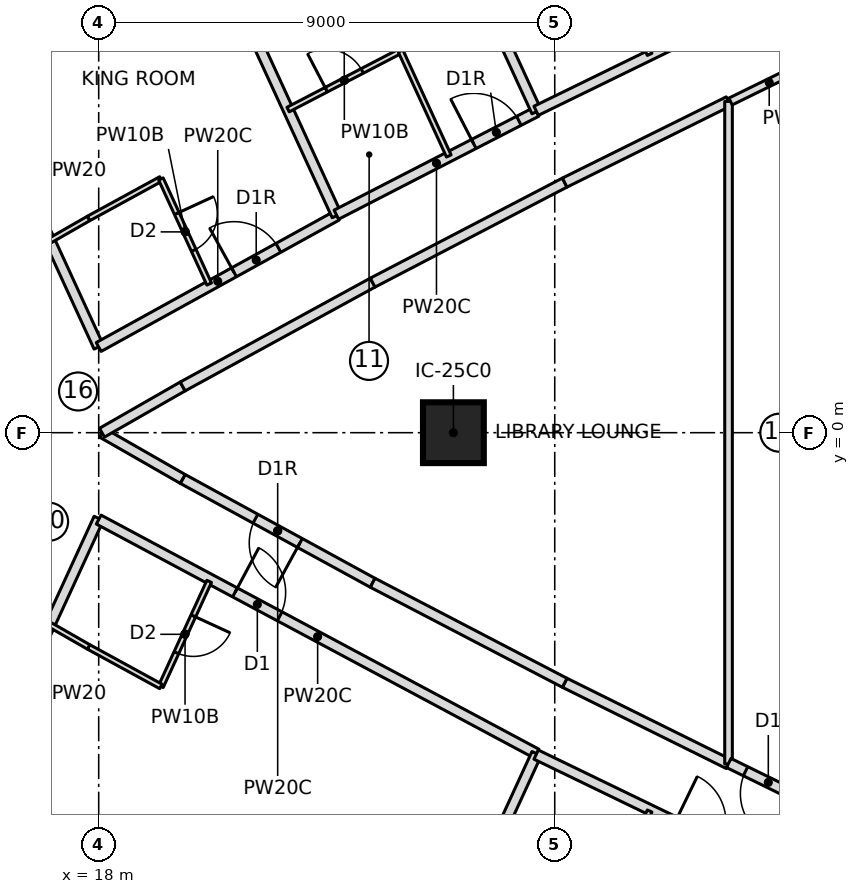
"""IFC4 building model, lengths in metres.
Left out: names, types, materials, properties, quantities, classifications, styles, units other than length and angle.
Written with IfcOpenShell. Run it as: python <this file> out.ifc"""

import sys

from ifc_helpers import new_model, si_unit, direction, frame, frame_2d, origin, origin_2d, place, context, subcontext, project, spatial, rectangle, extrude, element, fill, save


model = new_model("IFC4")
c1 = context("Model", 3, precision=1e-05, world=origin(), true_north=direction((0.0, 1.0)))
c2 = subcontext(c1, "Body", "Model", "MODEL_VIEW")
j1 = project(units=[si_unit("LENGTHUNIT", "METRE"), si_unit("PLANEANGLEUNIT", "RADIAN")], contexts=[c1])
p1 = place(None, origin())
s1 = spatial("IfcSite", under=j1, at=p1, CompositionType="ELEMENT")
p2 = place(p1, origin())
s2 = spatial("IfcBuilding", under=s1, at=p2, CompositionType="ELEMENT")
p3 = place(p2, frame((0.0, 0.0, 84.9)))
s3 = spatial("IfcBuildingStorey", under=s2, at=p3, CompositionType="ELEMENT", Elevation=84.9)
p4 = place(p3, frame((25.0, 0.0, 0.0), z_axis=(0.0, 0.0, 1.0), x_axis=(1.0, 0.0, 0.0)))
e1 = element("IfcColumn", 1, at=p4, inside=s3, PredefinedType="COLUMN", context=c2, shape_type="SweptSolid", body=[
    extrude(rectangle(XDim=1.2, YDim=1.2, at=origin_2d()), origin(), (0.0, 0.0, 1.0), 3.55),
])
p5 = place(p3, frame((14.815, 8.626, 0.0), z_axis=(0.0, 0.0, 1.0), x_axis=(0.417432341259, -0.908708006166, 0.0)))
e2 = element("IfcWall", 2, at=p5, inside=s3, PredefinedType="PARTITIONING", context=c2, shape_type="SweptSolid", body=[
    extrude(rectangle(XDim=7.631, YDim=0.2, at=frame_2d((3.815, 0.0))), origin(), (0.0, 0.0, 1.0), 3.25),
])
p6 = place(p3, frame((18.0, 1.692, 0.0), z_axis=(0.0, 0.0, 1.0), x_axis=(0.875548487611, 0.483130257634, 0.0)))
e3 = element("IfcWall", 3, at=p6, inside=s3, PredefinedType="PARTITIONING", context=c2, shape_type="SweptSolid", body=[
    extrude(rectangle(XDim=5.367, YDim=0.2, at=frame_2d((2.683, 0.0))), origin(), (0.0, 0.0, 1.0), 3.25),
])
p7 = place(p6, frame((3.05, 0.0, 0.0)))
e4 = element("IfcOpeningElement", 4, at=p7, cuts=e3, PredefinedType="OPENING", context=c2, shape_type="SweptSolid", body=[
    extrude(rectangle(XDim=1.0, YDim=2.1, at=frame_2d((0.5, 1.05))), frame((0.0, 0.11, 0.0), z_axis=(0.0, -1.0, 0.0), x_axis=(1.0, 0.0, 0.0)), (0.0, 0.0, 1.0), 0.22),
])
p8 = place(p3, frame((17.036, 3.79, 0.0), z_axis=(0.0, 0.0, 1.0), x_axis=(0.867629162742, 0.497211862248, 0.0)))
e5 = element("IfcWall", 5, at=p8, inside=s3, PredefinedType="PARTITIONING", context=c2, shape_type="SweptSolid", body=[
    extrude(rectangle(XDim=0.882, YDim=0.1, at=frame_2d((0.441, 0.0))), origin(), (0.0, 0.0, 1.0), 3.25),
])
p9 = place(p3, frame((17.801, 4.229, 0.0), z_axis=(0.0, 0.0, 1.0), x_axis=(0.877424481957, 0.479714788663, 0.0)))
e6 = element("IfcWall", 6, at=p9, inside=s3, PredefinedType="PARTITIONING", context=c2, shape_type="SweptSolid", body=[
    extrude(rectangle(XDim=1.625, YDim=0.1, at=frame_2d((0.813, 0.0))), origin(), (0.0, 0.0, 1.0), 3.25),
])
p10 = place(p3, frame((19.228, 5.008, 0.0), z_axis=(0.0, 0.0, 1.0), x_axis=(0.417450047292, -0.908699872354, 0.0)))
e7 = element("IfcWall", 7, at=p10, inside=s3, PredefinedType="PARTITIONING", context=c2, shape_type="SweptSolid", body=[
    extrude(rectangle(XDim=2.283, YDim=0.1, at=frame_2d((1.141, 0.0))), origin(), (0.0, 0.0, 1.0), 3.25),
])
p11 = place(p10, frame((0.75, 0.0, 0.0)))
e8 = element("IfcOpeningElement", 8, at=p11, cuts=e7, PredefinedType="OPENING", context=c2, shape_type="SweptSolid", body=[
    extrude(rectangle(XDim=0.8, YDim=2.1, at=frame_2d((0.4, 1.05))), frame((0.0, 0.06, 0.0), z_axis=(0.0, -1.0, 0.0), x_axis=(1.0, 0.0, 0.0)), (0.0, 0.0, 1.0), 0.12),
])
p12 = place(p3, frame((22.699, 4.284, 0.0), z_axis=(0.0, 0.0, 1.0), x_axis=(-0.417413534969, 0.908716644959, 0.0)))
e9 = element("IfcWall", 9, at=p12, inside=s3, PredefinedType="PARTITIONING", context=c2, shape_type="SweptSolid", body=[
    extrude(rectangle(XDim=7.609, YDim=0.2, at=frame_2d((3.805, 0.0))), origin(), (0.0, 0.0, 1.0), 3.25),
])
p13 = place(p3, frame((22.69, 4.302, 0.0), z_axis=(0.0, 0.0, 1.0), x_axis=(0.889236075961, 0.457448577667, 0.0)))
e10 = element("IfcWall", 10, at=p13, inside=s3, PredefinedType="PARTITIONING", context=c2, shape_type="SweptSolid", body=[
    extrude(rectangle(XDim=4.443, YDim=0.2, at=frame_2d((2.222, 0.0))), origin(), (0.0, 0.0, 1.0), 3.25),
])
p14 = place(p13, frame((3.05, 0.0, 0.0)))
e11 = element("IfcOpeningElement", 11, at=p14, cuts=e10, PredefinedType="OPENING", context=c2, shape_type="SweptSolid", body=[
    extrude(rectangle(XDim=1.0, YDim=2.1, at=frame_2d((0.5, 1.05))), frame((0.0, 0.11, 0.0), z_axis=(0.0, -1.0, 0.0), x_axis=(1.0, 0.0, 0.0)), (0.0, 0.0, 1.0), 0.22),
])
p15 = place(p3, frame((21.738, 6.377, 0.0), z_axis=(0.0, 0.0, 1.0), x_axis=(0.886911586599, 0.461939214135, 0.0)))
e12 = element("IfcWall", 12, at=p15, inside=s3, PredefinedType="PARTITIONING", context=c2, shape_type="SweptSolid", body=[
    extrude(rectangle(XDim=2.503, YDim=0.1, at=frame_2d((1.251, 0.0))), origin(), (0.0, 0.0, 1.0), 3.25),
])
p16 = place(p15, frame((0.85, 0.0, 0.0)))
e13 = element("IfcOpeningElement", 13, at=p16, cuts=e12, PredefinedType="OPENING", context=c2, shape_type="SweptSolid", body=[
    extrude(rectangle(XDim=0.8, YDim=2.1, at=frame_2d((0.4, 1.05))), frame((0.0, 0.06, 0.0), z_axis=(0.0, -1.0, 0.0), x_axis=(1.0, 0.0, 0.0)), (0.0, 0.0, 1.0), 0.12),
])
p17 = place(p3, frame((23.958, 7.533, 0.0), z_axis=(0.0, 0.0, 1.0), x_axis=(0.417454762401, -0.908697706253, 0.0)))
e14 = element("IfcWall", 14, at=p17, inside=s3, PredefinedType="PARTITIONING", context=c2, shape_type="SweptSolid", body=[
    extrude(rectangle(XDim=2.28, YDim=0.1, at=frame_2d((1.14, 0.0))), origin(), (0.0, 0.0, 1.0), 3.25),
])
p18 = place(p3, frame((26.641, 6.335, 0.0), z_axis=(0.0, 0.0, 1.0), x_axis=(-0.417455028008, 0.908697584233, 0.0)))
e15 = element("IfcWall", 15, at=p18, inside=s3, PredefinedType="PARTITIONING", context=c2, shape_type="SweptSolid", body=[
    extrude(rectangle(XDim=7.603, YDim=0.2, at=frame_2d((3.802, 0.0))), origin(), (0.0, 0.0, 1.0), 3.25),
])
p19 = place(p3, frame((32.0, 8.973, 0.0), z_axis=(0.0, 0.0, 1.0), x_axis=(-0.898654091263, -0.438657980956, 0.0)))
e16 = element("IfcWall", 16, at=p19, inside=s3, PredefinedType="PARTITIONING", context=c2, shape_type="SweptSolid", body=[
    extrude(rectangle(XDim=5.972, YDim=0.2, at=frame_2d((2.986, 0.0))), origin(), (0.0, 0.0, 1.0), 3.25),
])
p20 = place(p19, frame((0.35, 0.0, 0.0)))
e17 = element("IfcOpeningElement", 17, at=p20, cuts=e16, PredefinedType="OPENING", context=c2, shape_type="SweptSolid", body=[
    extrude(rectangle(XDim=1.0, YDim=2.1, at=frame_2d((0.5, 1.05))), frame((0.0, 0.11, 0.0), z_axis=(0.0, -1.0, 0.0), x_axis=(1.0, 0.0, 0.0)), (0.0, 0.0, 1.0), 0.22),
])
p21 = place(p3, frame((27.922, 9.537, 0.0), z_axis=(0.0, 0.0, 1.0), x_axis=(0.417433204355, -0.908707609686, 0.0)))
e18 = element("IfcWall", 18, at=p21, inside=s3, PredefinedType="PARTITIONING", context=c2, shape_type="SweptSolid", body=[
    extrude(rectangle(XDim=2.278, YDim=0.1, at=frame_2d((1.139, 0.0))), origin(), (0.0, 0.0, 1.0), 3.25),
])
p22 = place(p3, frame((14.815, -8.626, 0.0), z_axis=(0.0, 0.0, 1.0), x_axis=(0.417432341259, 0.908708006166, 0.0)))
e19 = element("IfcWall", 19, at=p22, inside=s3, PredefinedType="PARTITIONING", context=c2, shape_type="SweptSolid", body=[
    extrude(rectangle(XDim=7.631, YDim=0.2, at=frame_2d((3.815, 0.0))), origin(), (0.0, 0.0, 1.0), 3.25),
])
p23 = place(p3, frame((18.0, -1.715, 0.0), z_axis=(0.0, 0.0, 1.0), x_axis=(0.881859333365, -0.471512583244, 0.0)))
e20 = element("IfcWall", 20, at=p23, inside=s3, PredefinedType="PARTITIONING", context=c2, shape_type="SweptSolid", body=[
    extrude(rectangle(XDim=9.799, YDim=0.2, at=frame_2d((4.899, 0.0))), origin(), (0.0, 0.0, 1.0), 3.25),
])
p24 = place(p23, frame((3.05, 0.0, 0.0)))
e21 = element("IfcOpeningElement", 21, at=p24, cuts=e20, PredefinedType="OPENING", context=c2, shape_type="SweptSolid", body=[
    extrude(rectangle(XDim=1.0, YDim=2.1, at=frame_2d((0.5, 1.05))), frame((0.0, 0.11, 0.0), z_axis=(0.0, -1.0, 0.0), x_axis=(1.0, 0.0, 0.0)), (0.0, 0.0, 1.0), 0.22),
])
p25 = place(p3, frame((20.18, -2.934, 0.0), z_axis=(0.0, 0.0, 1.0), x_axis=(-0.417450047292, -0.908699872354, 0.0)))
e22 = element("IfcWall", 22, at=p25, inside=s3, PredefinedType="PARTITIONING", context=c2, shape_type="SweptSolid", body=[
    extrude(rectangle(XDim=2.283, YDim=0.1, at=frame_2d((1.141, 0.0))), origin(), (0.0, 0.0, 1.0), 3.25),
])
p26 = place(p25, frame((0.75, 0.0, 0.0)))
e23 = element("IfcOpeningElement", 23, at=p26, cuts=e22, PredefinedType="OPENING", context=c2, shape_type="SweptSolid", body=[
    extrude(rectangle(XDim=0.8, YDim=2.1, at=frame_2d((0.4, 1.05))), frame((0.0, 0.06, 0.0), z_axis=(0.0, -1.0, 0.0), x_axis=(1.0, 0.0, 0.0)), (0.0, 0.0, 1.0), 0.12),
])
p27 = place(p3, frame((19.228, -5.008, 0.0), z_axis=(0.0, 0.0, 1.0), x_axis=(-0.877424481957, 0.479714788663, 0.0)))
e24 = element("IfcWall", 24, at=p27, inside=s3, PredefinedType="PARTITIONING", context=c2, shape_type="SweptSolid", body=[
    extrude(rectangle(XDim=1.625, YDim=0.1, at=frame_2d((0.813, 0.0))), origin(), (0.0, 0.0, 1.0), 3.25),
])
p28 = place(p3, frame((17.801, -4.229, 0.0), z_axis=(0.0, 0.0, 1.0), x_axis=(-0.867629162742, 0.497211862248, 0.0)))
e25 = element("IfcWall", 25, at=p28, inside=s3, PredefinedType="PARTITIONING", context=c2, shape_type="SweptSolid", body=[
    extrude(rectangle(XDim=0.882, YDim=0.1, at=frame_2d((0.441, 0.0))), origin(), (0.0, 0.0, 1.0), 3.25),
])
p29 = place(p3, frame((23.467, -13.244, 0.0), z_axis=(0.0, 0.0, 1.0), x_axis=(0.417455028008, 0.908697584233, 0.0)))
e26 = element("IfcWall", 26, at=p29, inside=s3, PredefinedType="PARTITIONING", context=c2, shape_type="SweptSolid", body=[
    extrude(rectangle(XDim=7.603, YDim=0.2, at=frame_2d((3.802, 0.0))), origin(), (0.0, 0.0, 1.0), 3.25),
])
p30 = place(p3, frame((26.633, -6.353, 0.0), z_axis=(0.0, 0.0, 1.0), x_axis=(0.900101763883, -0.435679715679, 0.0)))
e27 = element("IfcWall", 27, at=p30, inside=s3, PredefinedType="PARTITIONING", context=c2, shape_type="SweptSolid", body=[
    extrude(rectangle(XDim=5.963, YDim=0.2, at=frame_2d((2.981, 0.0))), origin(), (0.0, 0.0, 1.0), 3.25),
])
p31 = place(p30, frame((3.05, 0.0, 0.0)))
e28 = element("IfcOpeningElement", 28, at=p31, cuts=e27, PredefinedType="OPENING", context=c2, shape_type="SweptSolid", body=[
    extrude(rectangle(XDim=1.0, YDim=2.1, at=frame_2d((0.5, 1.05))), frame((0.0, 0.11, 0.0), z_axis=(0.0, -1.0, 0.0), x_axis=(1.0, 0.0, 0.0)), (0.0, 0.0, 1.0), 0.22),
])
p32 = place(p3, frame((28.873, -7.467, 0.0), z_axis=(0.0, 0.0, 1.0), x_axis=(-0.417433204355, -0.908707609686, 0.0)))
e29 = element("IfcWall", 29, at=p32, inside=s3, PredefinedType="PARTITIONING", context=c2, shape_type="SweptSolid", body=[
    extrude(rectangle(XDim=2.278, YDim=0.1, at=frame_2d((1.139, 0.0))), origin(), (0.0, 0.0, 1.0), 3.25),
])
p33 = place(p3, frame((23.407, -2.962, 0.0), z_axis=(0.0, 0.0, 1.0), x_axis=(-0.877465075585, 0.479640533242, 0.0)))
e30 = element("IfcWall", 30, at=p33, inside=s3, PredefinedType="PARTITIONING", context=c2, shape_type="SweptSolid", body=[
    extrude(rectangle(XDim=4.273, YDim=0.2, at=frame_2d((2.137, 0.0))), origin(), (0.0, 0.0, 1.0), 3.25),
])
p34 = place(p33, frame((1.636, 0.0, 0.0)))
e31 = element("IfcOpeningElement", 31, at=p34, cuts=e30, PredefinedType="OPENING", context=c2, shape_type="SweptSolid", body=[
    extrude(rectangle(XDim=1.0, YDim=2.1, at=frame_2d((0.5, 1.05))), frame((0.0, 0.11, 0.0), z_axis=(0.0, -1.0, 0.0), x_axis=(1.0, 0.0, 0.0)), (0.0, 0.0, 1.0), 0.22),
])
p35 = place(p3, frame((30.43, -6.539, 0.0), z_axis=(0.0, 0.0, 1.0), x_axis=(-0.895964304417, 0.44412606905, 0.0)))
e32 = element("IfcWall", 32, at=p35, inside=s3, PredefinedType="PARTITIONING", context=c2, shape_type="SweptSolid", body=[
    extrude(rectangle(XDim=3.609, YDim=0.2, at=frame_2d((1.804, 0.0))), origin(), (0.0, 0.0, 1.0), 3.25),
])
p36 = place(p3, frame((27.196, -4.936, 0.0), z_axis=(0.0, 0.0, 1.0), x_axis=(-0.886899452904, 0.461962509775, 0.0)))
e33 = element("IfcWall", 33, at=p36, inside=s3, PredefinedType="PARTITIONING", context=c2, shape_type="SweptSolid", body=[
    extrude(rectangle(XDim=4.273, YDim=0.2, at=frame_2d((2.136, 0.0))), origin(), (0.0, 0.0, 1.0), 3.25),
])
for number, where, z_axis, x_axis in (
    (34, (19.657, -0.912, 0.0), (0.0, 0.0, 1.0), (-0.868, 0.497, 0.0)),
    (35, (18.065, 0.0, 0.0), (0.0, 0.0, 1.0), (0.868, 0.497, 0.0)),
):
    element("IfcWall", number, at=place(p3, frame(where, z_axis=z_axis, x_axis=x_axis)), inside=s3, PredefinedType="PARTITIONING", context=c2, shape_type="SweptSolid", body=[
        extrude(rectangle(XDim=1.835, YDim=0.2, at=frame_2d((0.918, 0.0))), origin(), (0.0, 0.0, 1.0), 3.25),
    ])
p37 = place(p3, frame((19.657, 0.912, 0.0), z_axis=(0.0, 0.0, 1.0), x_axis=(0.877465075585, 0.479640533242, 0.0)))
e36 = element("IfcWall", 36, at=p37, inside=s3, PredefinedType="PARTITIONING", context=c2, shape_type="SweptSolid", body=[
    extrude(rectangle(XDim=4.273, YDim=0.2, at=frame_2d((2.137, 0.0))), origin(), (0.0, 0.0, 1.0), 3.25),
])
p38 = place(p3, frame((23.407, 2.962, 0.0), z_axis=(0.0, 0.0, 1.0), x_axis=(0.886899452904, 0.461962509775, 0.0)))
e37 = element("IfcWall", 37, at=p38, inside=s3, PredefinedType="PARTITIONING", context=c2, shape_type="SweptSolid", body=[
    extrude(rectangle(XDim=4.273, YDim=0.2, at=frame_2d((2.136, 0.0))), origin(), (0.0, 0.0, 1.0), 3.25),
])
p39 = place(p3, frame((27.196, 4.936, 0.0), z_axis=(0.0, 0.0, 1.0), x_axis=(0.895964304417, 0.44412606905, 0.0)))
e38 = element("IfcWall", 38, at=p39, inside=s3, PredefinedType="PARTITIONING", context=c2, shape_type="SweptSolid", body=[
    extrude(rectangle(XDim=3.609, YDim=0.2, at=frame_2d((1.804, 0.0))), origin(), (0.0, 0.0, 1.0), 3.25),
])
p40 = place(p3, frame((30.43, -6.539, 0.0), z_axis=(0.0, 0.0, 1.0), x_axis=(0.0, 1.0, 0.0)))
e39 = element("IfcWall", 39, at=p40, inside=s3, PredefinedType="PARTITIONING", context=c2, shape_type="SweptSolid", body=[
    extrude(rectangle(XDim=13.077, YDim=0.15, at=frame_2d((6.539, 0.0))), origin(), (0.0, 0.0, 1.0), 3.25),
])
p41 = place(p3, frame((31.995, -7.285, 0.0), z_axis=(0.0, 0.0, 1.0), x_axis=(-0.897771601508, 0.440461294015, 0.0)))
e40 = element("IfcWall", 40, at=p41, inside=s3, PredefinedType="PARTITIONING", context=c2, shape_type="SweptSolid", body=[
    extrude(rectangle(XDim=1.739, YDim=0.2, at=frame_2d((0.869, 0.0))), origin(), (0.0, 0.0, 1.0), 3.25),
])
p42 = place(p41, frame((0.369, 0.0, 0.0)))
e41 = element("IfcOpeningElement", 41, at=p42, cuts=e40, PredefinedType="OPENING", context=c2, shape_type="SweptSolid", body=[
    extrude(rectangle(XDim=1.0, YDim=2.1, at=frame_2d((0.5, 1.05))), frame((0.0, 0.11, 0.0), z_axis=(0.0, -1.0, 0.0), x_axis=(1.0, 0.0, 0.0)), (0.0, 0.0, 1.0), 0.22),
])
p43 = place(p3, frame((30.47, 6.536, 0.0), z_axis=(0.0, 0.0, 1.0), x_axis=(0.897735805555, 0.440534247732, 0.0)))
e42 = element("IfcWall", 42, at=p43, inside=s3, PredefinedType="PARTITIONING", context=c2, shape_type="SweptSolid", body=[
    extrude(rectangle(XDim=1.699, YDim=0.15, at=frame_2d((0.85, 0.0))), origin(), (0.0, 0.0, 1.0), 3.25),
])
p44 = place(p11, origin())
e43 = element("IfcDoor", 43, at=p44, inside=s3, OperationType="SINGLE_SWING_LEFT", PredefinedType="DOOR", context=c2, shape_type="SweptSolid", body=[
    extrude(rectangle(XDim=0.8, YDim=2.1, at=frame_2d((0.4, 1.05))), frame((0.0, 0.025, 0.0), z_axis=(0.0, -1.0, 0.0), x_axis=(1.0, 0.0, 0.0)), (0.0, 0.0, 1.0), 0.05),
])
fill(e8, e43)
p45 = place(p7, origin())
e44 = element("IfcDoor", 44, at=p45, inside=s3, OperationType="SINGLE_SWING_RIGHT", PredefinedType="DOOR", context=c2, shape_type="SweptSolid", body=[
    extrude(rectangle(XDim=1.0, YDim=2.1, at=frame_2d((0.5, 1.05))), frame((0.0, 0.025, 0.0), z_axis=(0.0, -1.0, 0.0), x_axis=(1.0, 0.0, 0.0)), (0.0, 0.0, 1.0), 0.05),
])
fill(e4, e44)
p46 = place(p16, origin())
e45 = element("IfcDoor", 45, at=p46, inside=s3, OperationType="SINGLE_SWING_LEFT", PredefinedType="DOOR", context=c2, shape_type="SweptSolid", body=[
    extrude(rectangle(XDim=0.8, YDim=2.1, at=frame_2d((0.4, 1.05))), frame((0.0, 0.025, 0.0), z_axis=(0.0, -1.0, 0.0), x_axis=(1.0, 0.0, 0.0)), (0.0, 0.0, 1.0), 0.05),
])
fill(e13, e45)
p47 = place(p14, origin())
e46 = element("IfcDoor", 46, at=p47, inside=s3, OperationType="SINGLE_SWING_RIGHT", PredefinedType="DOOR", context=c2, shape_type="SweptSolid", body=[
    extrude(rectangle(XDim=1.0, YDim=2.1, at=frame_2d((0.5, 1.05))), frame((0.0, 0.025, 0.0), z_axis=(0.0, -1.0, 0.0), x_axis=(1.0, 0.0, 0.0)), (0.0, 0.0, 1.0), 0.05),
])
fill(e11, e46)
p48 = place(p26, origin())
e47 = element("IfcDoor", 47, at=p48, inside=s3, OperationType="SINGLE_SWING_LEFT", PredefinedType="DOOR", context=c2, shape_type="SweptSolid", body=[
    extrude(rectangle(XDim=0.8, YDim=2.1, at=frame_2d((0.4, 1.05))), frame((0.0, 0.025, 0.0), z_axis=(0.0, -1.0, 0.0), x_axis=(1.0, 0.0, 0.0)), (0.0, 0.0, 1.0), 0.05),
])
fill(e23, e47)
p49 = place(p24, origin())
e48 = element("IfcDoor", 48, at=p49, inside=s3, OperationType="SINGLE_SWING_LEFT", PredefinedType="DOOR", context=c2, shape_type="SweptSolid", body=[
    extrude(rectangle(XDim=1.0, YDim=2.1, at=frame_2d((0.5, 1.05))), frame((0.0, 0.025, 0.0), z_axis=(0.0, -1.0, 0.0), x_axis=(1.0, 0.0, 0.0)), (0.0, 0.0, 1.0), 0.05),
])
fill(e21, e48)
p50 = place(p34, origin())
e49 = element("IfcDoor", 49, at=p50, inside=s3, OperationType="SINGLE_SWING_RIGHT", PredefinedType="DOOR", context=c2, shape_type="SweptSolid", body=[
    extrude(rectangle(XDim=1.0, YDim=2.1, at=frame_2d((0.5, 1.05))), frame((0.0, 0.025, 0.0), z_axis=(0.0, -1.0, 0.0), x_axis=(1.0, 0.0, 0.0)), (0.0, 0.0, 1.0), 0.05),
])
fill(e31, e49)
p51 = place(p42, origin())
e50 = element("IfcDoor", 50, at=p51, inside=s3, OperationType="SINGLE_SWING_LEFT", PredefinedType="DOOR", context=c2, shape_type="SweptSolid", body=[
    extrude(rectangle(XDim=1.0, YDim=2.1, at=frame_2d((0.5, 1.05))), frame((0.0, 0.025, 0.0), z_axis=(0.0, -1.0, 0.0), x_axis=(1.0, 0.0, 0.0)), (0.0, 0.0, 1.0), 0.05),
])
fill(e41, e50)
save(model, sys.argv[1])
